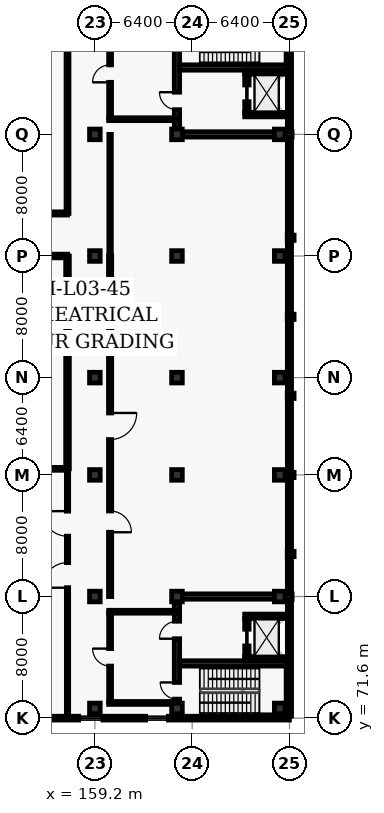
"""IFC4 building model, lengths in metres.
Left out: names, types, materials, properties, quantities, classifications, styles, units other than length and angle.
Written with IfcOpenShell. Run it as: python <this file> out.ifc"""

import sys

from ifc_helpers import new_model, si_unit, direction, frame, frame_2d, origin, origin_2d, place, context, subcontext, project, spatial, rectangle, extrude, element, fill, save


model = new_model("IFC4")
c1 = context("Model", 3, precision=1e-05, world=origin(), true_north=direction((0.0, 1.0)))
c2 = subcontext(c1, "Body", "Model", "MODEL_VIEW")
j1 = project(units=[si_unit("LENGTHUNIT", "METRE"), si_unit("PLANEANGLEUNIT", "RADIAN")], contexts=[c1])
p1 = place(None, origin())
s1 = spatial("IfcSite", under=j1, at=p1, CompositionType="ELEMENT")
p2 = place(p1, origin())
s2 = spatial("IfcBuilding", under=s1, at=p2, CompositionType="ELEMENT")
p3 = place(p2, frame((0.0, 0.0, 15.6)))
s3 = spatial("IfcBuildingStorey", under=s2, at=p3, CompositionType="ELEMENT", Elevation=15.6)
for number, where, z_axis, x_axis in (
    (1, (159.2, 72.24, 0.0), (0.0, 0.0, 1.0), (1.0, 0.0, 0.0)),
    (2, (159.2, 79.6, 0.0), (0.0, 0.0, 1.0), (1.0, 0.0, 0.0)),
    (3, (159.2, 87.6, 0.0), (0.0, 0.0, 1.0), (1.0, 0.0, 0.0)),
    (4, (159.2, 94.0, 0.0), (0.0, 0.0, 1.0), (1.0, 0.0, 0.0)),
    (5, (159.2, 102.0, 0.0), (0.0, 0.0, 1.0), (1.0, 0.0, 0.0)),
    (6, (159.2, 110.0, 0.0), (0.0, 0.0, 1.0), (1.0, 0.0, 0.0)),
    (7, (164.6, 72.24, 0.0), (0.0, 0.0, 1.0), (1.0, 0.0, 0.0)),
    (8, (164.6, 79.6, 0.0), (0.0, 0.0, 1.0), (1.0, 0.0, 0.0)),
    (9, (164.6, 87.6, 0.0), (0.0, 0.0, 1.0), (1.0, 0.0, 0.0)),
    (10, (164.6, 94.0, 0.0), (0.0, 0.0, 1.0), (1.0, 0.0, 0.0)),
    (11, (164.6, 102.0, 0.0), (0.0, 0.0, 1.0), (1.0, 0.0, 0.0)),
    (12, (164.6, 110.0, 0.0), (0.0, 0.0, 1.0), (1.0, 0.0, 0.0)),
    (13, (171.36, 72.24, 0.0), (0.0, 0.0, 1.0), (1.0, 0.0, 0.0)),
    (14, (171.36, 79.6, 0.0), (0.0, 0.0, 1.0), (1.0, 0.0, 0.0)),
    (15, (171.36, 87.6, 0.0), (0.0, 0.0, 1.0), (1.0, 0.0, 0.0)),
    (16, (171.36, 94.0, 0.0), (0.0, 0.0, 1.0), (1.0, 0.0, 0.0)),
    (17, (171.36, 102.0, 0.0), (0.0, 0.0, 1.0), (1.0, 0.0, 0.0)),
    (18, (171.36, 110.0, 0.0), (0.0, 0.0, 1.0), (1.0, 0.0, 0.0)),
):
    element("IfcColumn", number, at=place(p3, frame(where, z_axis=z_axis, x_axis=x_axis)), inside=s3, PredefinedType="COLUMN", context=c2, shape_type="SweptSolid", body=[
        extrude(rectangle(XDim=0.7, YDim=0.7, at=origin_2d()), origin(), (0.0, 0.0, 1.0), 4.8),
    ])
for number, where, z_axis, x_axis in (
    (19, (172.08, 82.4, 0.0), (0.0, 0.0, 1.0), (1.0, 0.0, 0.0)),
    (20, (172.08, 87.6, 0.0), (0.0, 0.0, 1.0), (1.0, 0.0, 0.0)),
    (21, (172.08, 92.8, 0.0), (0.0, 0.0, 1.0), (1.0, 0.0, 0.0)),
    (22, (172.08, 98.0, 0.0), (0.0, 0.0, 1.0), (1.0, 0.0, 0.0)),
    (23, (172.08, 103.2, 0.0), (0.0, 0.0, 1.0), (1.0, 0.0, 0.0)),
):
    element("IfcColumn", number, at=place(p3, frame(where, z_axis=z_axis, x_axis=x_axis)), inside=s3, PredefinedType="PILASTER", context=c2, shape_type="SweptSolid", body=[
        extrude(rectangle(XDim=0.35, YDim=0.45, at=origin_2d()), origin(), (0.0, 0.0, 1.0), 4.8),
    ])
p4 = place(p3, frame((172.0, 117.86, 0.0), z_axis=(0.0, 0.0, 1.0), x_axis=(0.0, -1.0, 0.0)))
e24 = element("IfcWall", 24, at=p4, inside=s3, PredefinedType="SOLIDWALL", context=c2, shape_type="SweptSolid", body=[
    extrude(rectangle(XDim=46.12, YDim=0.275, at=frame_2d((23.06, 0.0))), origin(), (0.0, 0.0, 1.0), 4.58),
])
p5 = place(p3, frame((172.0, 71.6, 0.0), z_axis=(0.0, 0.0, 1.0), x_axis=(-1.0, 0.0, 0.0)))
e25 = element("IfcWall", 25, at=p5, inside=s3, PredefinedType="SOLIDWALL", context=c2, shape_type="SweptSolid", body=[
    extrude(rectangle(XDim=32.4, YDim=0.25, at=frame_2d((16.2, 0.0))), origin(), (0.0, 0.0, 1.0), 4.58),
])
p6 = place(p5, frame((7.96, 0.0, 0.8)))
e26 = element("IfcOpeningElement", 26, at=p6, cuts=e25, PredefinedType="OPENING", context=c2, shape_type="SweptSolid", body=[
    extrude(rectangle(XDim=1.5, YDim=2.1, at=frame_2d((0.75, 1.05))), frame((0.0, 0.135, 0.0), z_axis=(0.0, -1.0, 0.0), x_axis=(1.0, 0.0, 0.0)), (0.0, 0.0, 1.0), 0.27),
])
p7 = place(p5, frame((12.27, 0.0, 0.8)))
e27 = element("IfcOpeningElement", 27, at=p7, cuts=e25, PredefinedType="OPENING", context=c2, shape_type="SweptSolid", body=[
    extrude(rectangle(XDim=1.6, YDim=2.1, at=frame_2d((0.8, 1.05))), frame((0.0, 0.135, 0.0), z_axis=(0.0, -1.0, 0.0), x_axis=(1.0, 0.0, 0.0)), (0.0, 0.0, 1.0), 0.27),
])
p8 = place(p5, frame((19.48, 0.0, 0.8)))
e28 = element("IfcOpeningElement", 28, at=p8, cuts=e25, PredefinedType="OPENING", context=c2, shape_type="SweptSolid", body=[
    extrude(rectangle(XDim=1.7, YDim=2.15, at=frame_2d((0.85, 1.075))), frame((0.0, 0.135, 0.0), z_axis=(0.0, -1.0, 0.0), x_axis=(1.0, 0.0, 0.0)), (0.0, 0.0, 1.0), 0.27),
])
p9 = place(p5, frame((25.24, 0.0, 0.8)))
e29 = element("IfcOpeningElement", 29, at=p9, cuts=e25, PredefinedType="OPENING", context=c2, shape_type="SweptSolid", body=[
    extrude(rectangle(XDim=1.8, YDim=2.15, at=frame_2d((0.9, 1.075))), frame((0.0, 0.135, 0.0), z_axis=(0.0, -1.0, 0.0), x_axis=(1.0, 0.0, 0.0)), (0.0, 0.0, 1.0), 0.27),
])
p10 = place(p3, frame((164.952, 79.6, 0.0), z_axis=(0.0, 0.0, 1.0), x_axis=(1.0, 0.0, 0.0)))
e30 = element("IfcWall", 30, at=p10, inside=s3, PredefinedType="SHEAR", context=c2, shape_type="SweptSolid", body=[
    extrude(rectangle(XDim=7.223, YDim=0.35, at=frame_2d((3.612, 0.0))), origin(), (0.0, 0.0, 1.0), 4.58),
])
p11 = place(p3, frame((164.6, 71.775, 0.0), z_axis=(0.0, 0.0, 1.0), x_axis=(0.0, 1.0, 0.0)))
e31 = element("IfcWall", 31, at=p11, inside=s3, PredefinedType="SHEAR", context=c2, shape_type="SweptSolid", body=[
    extrude(rectangle(XDim=7.473, YDim=0.35, at=frame_2d((3.737, 0.0))), origin(), (0.0, 0.0, 1.0), 4.58),
])
p12 = place(p11, frame((1.075, 0.0, 0.0)))
e32 = element("IfcOpeningElement", 32, at=p12, cuts=e31, PredefinedType="OPENING", context=c2, shape_type="SweptSolid", body=[
    extrude(rectangle(XDim=1.1, YDim=2.15, at=frame_2d((0.55, 1.075))), frame((0.0, 0.185, 0.0), z_axis=(0.0, -1.0, 0.0), x_axis=(1.0, 0.0, 0.0)), (0.0, 0.0, 1.0), 0.37),
])
p13 = place(p11, frame((5.05, 0.0, 0.0)))
e33 = element("IfcOpeningElement", 33, at=p13, cuts=e31, PredefinedType="OPENING", context=c2, shape_type="SweptSolid", body=[
    extrude(rectangle(XDim=1.15, YDim=2.2, at=frame_2d((0.575, 1.1))), frame((0.0, 0.185, 0.0), z_axis=(0.0, -1.0, 0.0), x_axis=(1.0, 0.0, 0.0)), (0.0, 0.0, 1.0), 0.37),
])
p14 = place(p3, frame((164.775, 75.2, 0.0), z_axis=(0.0, 0.0, 1.0), x_axis=(1.0, 0.0, 0.0)))
e34 = element("IfcWall", 34, at=p14, inside=s3, PredefinedType="SHEAR", context=c2, shape_type="SweptSolid", body=[
    extrude(rectangle(XDim=7.05, YDim=0.35, at=frame_2d((3.525, 0.0))), origin(), (0.0, 0.0, 1.0), 4.58),
])
for number, where, z_axis, x_axis in (
    (35, (169.055, 75.5, 0.0), (0.0, 0.0, 1.0), (1.0, 0.0, 0.0)),
    (36, (169.055, 78.3, 0.0), (0.0, 0.0, 1.0), (1.0, 0.0, 0.0)),
):
    element("IfcWall", number, at=place(p3, frame(where, z_axis=z_axis, x_axis=x_axis)), inside=s3, PredefinedType="SHEAR", context=c2, shape_type="SweptSolid", body=[
        extrude(rectangle(XDim=2.89, YDim=0.29, at=frame_2d((1.445, 0.0))), origin(), (0.0, 0.0, 1.0), 4.58),
    ])
p15 = place(p3, frame((169.2, 75.645, 0.0), z_axis=(0.0, 0.0, 1.0), x_axis=(0.0, 1.0, 0.0)))
e37 = element("IfcWall", 37, at=p15, inside=s3, PredefinedType="SHEAR", context=c2, shape_type="SweptSolid", body=[
    extrude(rectangle(XDim=2.51, YDim=0.29, at=frame_2d((1.255, 0.0))), origin(), (0.0, 0.0, 1.0), 4.58),
])
p16 = place(p15, frame((0.705, 0.0, 0.0)))
e38 = element("IfcOpeningElement", 38, at=p16, cuts=e37, PredefinedType="OPENING", context=c2, shape_type="SweptSolid", body=[
    extrude(rectangle(XDim=1.1, YDim=2.15, at=frame_2d((0.55, 1.075))), frame((0.0, 0.155, 0.0), z_axis=(0.0, -1.0, 0.0), x_axis=(1.0, 0.0, 0.0)), (0.0, 0.0, 1.0), 0.31),
])
p17 = place(p3, frame((160.105, 72.6, 0.0), z_axis=(0.0, 0.0, 1.0), x_axis=(1.0, 0.0, 0.0)))
e39 = element("IfcWall", 39, at=p17, inside=s3, PredefinedType="PARTITIONING", context=c2, shape_type="SweptSolid", body=[
    extrude(rectangle(XDim=4.143, YDim=0.19, at=frame_2d((2.072, 0.0))), origin(), (0.0, 0.0, 1.0), 3.93),
])
p18 = place(p3, frame((160.105, 78.6, 0.0), z_axis=(0.0, 0.0, 1.0), x_axis=(1.0, 0.0, 0.0)))
e40 = element("IfcWall", 40, at=p18, inside=s3, PredefinedType="PARTITIONING", context=c2, shape_type="SweptSolid", body=[
    extrude(rectangle(XDim=4.495, YDim=0.19, at=frame_2d((2.248, 0.0))), origin(), (0.0, 0.0, 1.0), 4.58),
])
p19 = place(p3, frame((160.2, 72.695, 0.0), z_axis=(0.0, 0.0, 1.0), x_axis=(0.0, 1.0, 0.0)))
e41 = element("IfcWall", 41, at=p19, inside=s3, PredefinedType="PARTITIONING", context=c2, shape_type="SweptSolid", body=[
    extrude(rectangle(XDim=5.81, YDim=0.19, at=frame_2d((2.905, 0.0))), origin(), (0.0, 0.0, 1.0), 4.58),
])
p20 = place(p19, frame((2.33, 0.0, 0.0)))
e42 = element("IfcOpeningElement", 42, at=p20, cuts=e41, PredefinedType="OPENING", context=c2, shape_type="SweptSolid", body=[
    extrude(rectangle(XDim=1.15, YDim=2.2, at=frame_2d((0.575, 1.1))), frame((0.0, 0.105, 0.0), z_axis=(0.0, -1.0, 0.0), x_axis=(1.0, 0.0, 0.0)), (0.0, 0.0, 1.0), 0.21),
])
p21 = place(p3, frame((164.952, 110.0, 0.0), z_axis=(0.0, 0.0, 1.0), x_axis=(1.0, 0.0, 0.0)))
e43 = element("IfcWall", 43, at=p21, inside=s3, PredefinedType="SHEAR", context=c2, shape_type="SweptSolid", body=[
    extrude(rectangle(XDim=7.223, YDim=0.35, at=frame_2d((3.612, 0.0))), origin(), (0.0, 0.0, 1.0), 4.58),
])
p22 = place(p3, frame((164.6, 110.352, 0.0), z_axis=(0.0, 0.0, 1.0), x_axis=(0.0, 1.0, 0.0)))
e44 = element("IfcWall", 44, at=p22, inside=s3, PredefinedType="SHEAR", context=c2, shape_type="SweptSolid", body=[
    extrude(rectangle(XDim=7.473, YDim=0.35, at=frame_2d((3.736, 0.0))), origin(), (0.0, 0.0, 1.0), 4.58),
])
p23 = place(p22, frame((5.298, 0.0, 0.0)))
e45 = element("IfcOpeningElement", 45, at=p23, cuts=e44, PredefinedType="OPENING", context=c2, shape_type="SweptSolid", body=[
    extrude(rectangle(XDim=1.1, YDim=2.15, at=frame_2d((0.55, 1.075))), frame((0.0, 0.185, 0.0), z_axis=(0.0, -1.0, 0.0), x_axis=(1.0, 0.0, 0.0)), (0.0, 0.0, 1.0), 0.37),
])
p24 = place(p22, frame((1.273, 0.0, 0.0)))
e46 = element("IfcOpeningElement", 46, at=p24, cuts=e44, PredefinedType="OPENING", context=c2, shape_type="SweptSolid", body=[
    extrude(rectangle(XDim=1.15, YDim=2.2, at=frame_2d((0.575, 1.1))), frame((0.0, 0.185, 0.0), z_axis=(0.0, -1.0, 0.0), x_axis=(1.0, 0.0, 0.0)), (0.0, 0.0, 1.0), 0.37),
])
p25 = place(p3, frame((164.775, 114.4, 0.0), z_axis=(0.0, 0.0, 1.0), x_axis=(1.0, 0.0, 0.0)))
e47 = element("IfcWall", 47, at=p25, inside=s3, PredefinedType="SHEAR", context=c2, shape_type="SweptSolid", body=[
    extrude(rectangle(XDim=7.05, YDim=0.35, at=frame_2d((3.525, 0.0))), origin(), (0.0, 0.0, 1.0), 4.58),
])
for number, where, z_axis, x_axis in (
    (48, (169.055, 111.3, 0.0), (0.0, 0.0, 1.0), (1.0, 0.0, 0.0)),
    (49, (169.055, 114.1, 0.0), (0.0, 0.0, 1.0), (1.0, 0.0, 0.0)),
):
    element("IfcWall", number, at=place(p3, frame(where, z_axis=z_axis, x_axis=x_axis)), inside=s3, PredefinedType="SHEAR", context=c2, shape_type="SweptSolid", body=[
        extrude(rectangle(XDim=2.89, YDim=0.29, at=frame_2d((1.445, 0.0))), origin(), (0.0, 0.0, 1.0), 4.58),
    ])
p26 = place(p3, frame((169.2, 111.445, 0.0), z_axis=(0.0, 0.0, 1.0), x_axis=(0.0, 1.0, 0.0)))
e50 = element("IfcWall", 50, at=p26, inside=s3, PredefinedType="SHEAR", context=c2, shape_type="SweptSolid", body=[
    extrude(rectangle(XDim=2.51, YDim=0.29, at=frame_2d((1.255, 0.0))), origin(), (0.0, 0.0, 1.0), 4.58),
])
p27 = place(p26, frame((0.705, 0.0, 0.0)))
e51 = element("IfcOpeningElement", 51, at=p27, cuts=e50, PredefinedType="OPENING", context=c2, shape_type="SweptSolid", body=[
    extrude(rectangle(XDim=1.1, YDim=2.15, at=frame_2d((0.55, 1.075))), frame((0.0, 0.155, 0.0), z_axis=(0.0, -1.0, 0.0), x_axis=(1.0, 0.0, 0.0)), (0.0, 0.0, 1.0), 0.31),
])
p28 = place(p3, frame((160.105, 111.0, 0.0), z_axis=(0.0, 0.0, 1.0), x_axis=(1.0, 0.0, 0.0)))
e52 = element("IfcWall", 52, at=p28, inside=s3, PredefinedType="PARTITIONING", context=c2, shape_type="SweptSolid", body=[
    extrude(rectangle(XDim=4.495, YDim=0.19, at=frame_2d((2.248, 0.0))), origin(), (0.0, 0.0, 1.0), 4.58),
])
p29 = place(p3, frame((160.2, 111.095, 0.0), z_axis=(0.0, 0.0, 1.0), x_axis=(0.0, 1.0, 0.0)))
e53 = element("IfcWall", 53, at=p29, inside=s3, PredefinedType="PARTITIONING", context=c2, shape_type="SweptSolid", body=[
    extrude(rectangle(XDim=5.81, YDim=0.19, at=frame_2d((2.905, 0.0))), origin(), (0.0, 0.0, 1.0), 4.58),
])
p30 = place(p29, frame((2.33, 0.0, 0.0)))
e54 = element("IfcOpeningElement", 54, at=p30, cuts=e53, PredefinedType="OPENING", context=c2, shape_type="SweptSolid", body=[
    extrude(rectangle(XDim=1.15, YDim=2.2, at=frame_2d((0.575, 1.1))), frame((0.0, 0.105, 0.0), z_axis=(0.0, -1.0, 0.0), x_axis=(1.0, 0.0, 0.0)), (0.0, 0.0, 1.0), 0.21),
])
p31 = place(p3, frame((157.4, 102.0, 0.0), z_axis=(0.0, 0.0, 1.0), x_axis=(-1.0, 0.0, 0.0)))
e55 = element("IfcWall", 55, at=p31, inside=s3, PredefinedType="PARTITIONING", context=c2, shape_type="SweptSolid", body=[
    extrude(rectangle(XDim=17.8, YDim=0.24, at=frame_2d((8.9, 0.0))), origin(), (0.0, 0.0, 1.0), 3.93),
])
p32 = place(p31, frame((8.05, 0.0, 0.0)))
e56 = element("IfcOpeningElement", 56, at=p32, cuts=e55, PredefinedType="OPENING", context=c2, shape_type="SweptSolid", body=[
    extrude(rectangle(XDim=1.7, YDim=2.3, at=frame_2d((0.85, 1.15))), frame((0.0, 0.13, 0.0), z_axis=(0.0, -1.0, 0.0), x_axis=(1.0, 0.0, 0.0)), (0.0, 0.0, 1.0), 0.26),
])
p33 = place(p31, frame((13.184, 0.0, 0.0)))
e57 = element("IfcOpeningElement", 57, at=p33, cuts=e55, PredefinedType="OPENING", context=c2, shape_type="SweptSolid", body=[
    extrude(rectangle(XDim=1.4, YDim=2.25, at=frame_2d((0.7, 1.125))), frame((0.0, 0.13, 0.0), z_axis=(0.0, -1.0, 0.0), x_axis=(1.0, 0.0, 0.0)), (0.0, 0.0, 1.0), 0.26),
])
p34 = place(p3, frame((139.6, 104.8, 0.0), z_axis=(0.0, 0.0, 1.0), x_axis=(1.0, 0.0, 0.0)))
e58 = element("IfcWall", 58, at=p34, inside=s3, PredefinedType="PARTITIONING", context=c2, shape_type="SweptSolid", body=[
    extrude(rectangle(XDim=17.8, YDim=0.21, at=frame_2d((8.9, 0.0))), origin(), (0.0, 0.0, 1.0), 4.58),
])
p35 = place(p34, frame((8.39, 0.0, 0.0)))
e59 = element("IfcOpeningElement", 59, at=p35, cuts=e58, PredefinedType="OPENING", context=c2, shape_type="SweptSolid", body=[
    extrude(rectangle(XDim=1.02, YDim=2.1, at=frame_2d((0.51, 1.05))), frame((0.0, 0.115, 0.0), z_axis=(0.0, -1.0, 0.0), x_axis=(1.0, 0.0, 0.0)), (0.0, 0.0, 1.0), 0.23),
])
p36 = place(p34, frame((13.184, 0.0, 0.0)))
e60 = element("IfcOpeningElement", 60, at=p36, cuts=e58, PredefinedType="OPENING", context=c2, shape_type="SweptSolid", body=[
    extrude(rectangle(XDim=1.4, YDim=2.25, at=frame_2d((0.7, 1.125))), frame((0.0, 0.115, 0.0), z_axis=(0.0, -1.0, 0.0), x_axis=(1.0, 0.0, 0.0)), (0.0, 0.0, 1.0), 0.23),
])
p37 = place(p3, frame((157.4, 104.8, 0.0), z_axis=(0.0, 0.0, 1.0), x_axis=(0.0, 1.0, 0.0)))
e61 = element("IfcWall", 61, at=p37, inside=s3, PredefinedType="PARTITIONING", context=c2, shape_type="SweptSolid", body=[
    extrude(rectangle(XDim=13.2, YDim=0.19, at=frame_2d((6.6, 0.0))), origin(), (0.0, 0.0, 1.0), 4.58),
])
p38 = place(p3, frame((160.2, 110.0, 0.0), z_axis=(0.0, 0.0, 1.0), x_axis=(0.0, -1.0, 0.0)))
e62 = element("IfcWall", 62, at=p38, inside=s3, PredefinedType="PARTITIONING", context=c2, shape_type="SweptSolid", body=[
    extrude(rectangle(XDim=8.0, YDim=0.165, at=frame_2d((4.0, 0.0))), origin(), (0.0, 0.0, 1.0), 4.58),
])
p39 = place(p3, frame((157.4, 71.6, 0.0), z_axis=(0.0, 0.0, 1.0), x_axis=(0.0, 1.0, 0.0)))
e63 = element("IfcWall", 63, at=p39, inside=s3, PredefinedType="PARTITIONING", context=c2, shape_type="SweptSolid", body=[
    extrude(rectangle(XDim=16.4, YDim=0.15, at=frame_2d((8.2, 0.0))), origin(), (0.0, 0.0, 1.0), 4.58),
])
p40 = place(p39, frame((8.58, 0.0, 0.0)))
e64 = element("IfcOpeningElement", 64, at=p40, cuts=e63, PredefinedType="OPENING", context=c2, shape_type="SweptSolid", body=[
    extrude(rectangle(XDim=1.65, YDim=2.3, at=frame_2d((0.825, 1.15))), frame((0.0, 0.085, 0.0), z_axis=(0.0, -1.0, 0.0), x_axis=(1.0, 0.0, 0.0)), (0.0, 0.0, 1.0), 0.17),
])
p41 = place(p39, frame((11.967, 0.0, 0.0)))
e65 = element("IfcOpeningElement", 65, at=p41, cuts=e63, PredefinedType="OPENING", context=c2, shape_type="SweptSolid", body=[
    extrude(rectangle(XDim=1.65, YDim=2.3, at=frame_2d((0.825, 1.15))), frame((0.0, 0.085, 0.0), z_axis=(0.0, -1.0, 0.0), x_axis=(1.0, 0.0, 0.0)), (0.0, 0.0, 1.0), 0.17),
])
p42 = place(p3, frame((157.4, 88.0, 0.0), z_axis=(0.0, 0.0, 1.0), x_axis=(0.0, 1.0, 0.0)))
e66 = element("IfcWall", 66, at=p42, inside=s3, PredefinedType="PARTITIONING", context=c2, shape_type="SweptSolid", body=[
    extrude(rectangle(XDim=14.0, YDim=0.24, at=frame_2d((7.0, 0.0))), origin(), (0.0, 0.0, 1.0), 4.58),
])
p43 = place(p3, frame((160.2, 102.0, 0.0), z_axis=(0.0, 0.0, 1.0), x_axis=(0.0, -1.0, 0.0)))
e67 = element("IfcWall", 67, at=p43, inside=s3, PredefinedType="PARTITIONING", context=c2, shape_type="SweptSolid", body=[
    extrude(rectangle(XDim=22.4, YDim=0.21, at=frame_2d((11.2, 0.0))), origin(), (0.0, 0.0, 1.0), 4.58),
])
p44 = place(p43, frame((10.325, 0.0, 0.0)))
e68 = element("IfcOpeningElement", 68, at=p44, cuts=e67, PredefinedType="OPENING", context=c2, shape_type="SweptSolid", body=[
    extrude(rectangle(XDim=1.75, YDim=2.35, at=frame_2d((0.875, 1.175))), frame((0.0, 0.115, 0.0), z_axis=(0.0, -1.0, 0.0), x_axis=(1.0, 0.0, 0.0)), (0.0, 0.0, 1.0), 0.23),
])
p45 = place(p43, frame((16.772, 0.0, 0.0)))
e69 = element("IfcOpeningElement", 69, at=p45, cuts=e67, PredefinedType="OPENING", context=c2, shape_type="SweptSolid", body=[
    extrude(rectangle(XDim=1.4, YDim=2.25, at=frame_2d((0.7, 1.125))), frame((0.0, 0.115, 0.0), z_axis=(0.0, -1.0, 0.0), x_axis=(1.0, 0.0, 0.0)), (0.0, 0.0, 1.0), 0.23),
])
p46 = place(p3, frame((139.6, 88.0, 0.0), z_axis=(0.0, 0.0, 1.0), x_axis=(1.0, 0.0, 0.0)))
e70 = element("IfcWall", 70, at=p46, inside=s3, PredefinedType="PARTITIONING", context=c2, shape_type="SweptSolid", body=[
    extrude(rectangle(XDim=17.8, YDim=0.19, at=frame_2d((8.9, 0.0))), origin(), (0.0, 0.0, 1.0), 3.93),
])
p47 = place(p6, origin())
e71 = element("IfcWindow", 71, at=p47, inside=s3, PartitioningType="SINGLE_PANEL", PredefinedType="WINDOW", context=c2, shape_type="SweptSolid", body=[
    extrude(rectangle(XDim=1.5, YDim=2.1, at=frame_2d((0.75, 1.05))), frame((0.0, 0.03, 0.0), z_axis=(0.0, -1.0, 0.0), x_axis=(1.0, 0.0, 0.0)), (0.0, 0.0, 1.0), 0.06),
])
fill(e26, e71)
p48 = place(p7, origin())
e72 = element("IfcWindow", 72, at=p48, inside=s3, PartitioningType="SINGLE_PANEL", PredefinedType="WINDOW", context=c2, shape_type="SweptSolid", body=[
    extrude(rectangle(XDim=1.6, YDim=2.1, at=frame_2d((0.8, 1.05))), frame((0.0, 0.03, 0.0), z_axis=(0.0, -1.0, 0.0), x_axis=(1.0, 0.0, 0.0)), (0.0, 0.0, 1.0), 0.06),
])
fill(e27, e72)
p49 = place(p12, origin())
e73 = element("IfcDoor", 73, at=p49, inside=s3, OperationType="SINGLE_SWING_RIGHT", PredefinedType="DOOR", context=c2, shape_type="SweptSolid", body=[
    extrude(rectangle(XDim=1.1, YDim=2.15, at=frame_2d((0.55, 1.075))), frame((0.0, 0.025, 0.0), z_axis=(0.0, -1.0, 0.0), x_axis=(1.0, 0.0, 0.0)), (0.0, 0.0, 1.0), 0.05),
])
fill(e32, e73)
p50 = place(p13, origin())
e74 = element("IfcDoor", 74, at=p50, inside=s3, OperationType="SINGLE_SWING_LEFT", PredefinedType="DOOR", context=c2, shape_type="SweptSolid", body=[
    extrude(rectangle(XDim=1.15, YDim=2.2, at=frame_2d((0.575, 1.1))), frame((0.0, 0.025, 0.0), z_axis=(0.0, -1.0, 0.0), x_axis=(1.0, 0.0, 0.0)), (0.0, 0.0, 1.0), 0.05),
])
fill(e33, e74)
p51 = place(p16, origin())
e75 = element("IfcDoor", 75, at=p51, inside=s3, OperationType="SLIDING_TO_LEFT", PredefinedType="DOOR", context=c2, shape_type="SweptSolid", body=[
    extrude(rectangle(XDim=1.1, YDim=2.15, at=frame_2d((0.55, 1.075))), frame((0.0, 0.025, 0.0), z_axis=(0.0, -1.0, 0.0), x_axis=(1.0, 0.0, 0.0)), (0.0, 0.0, 1.0), 0.05),
])
fill(e38, e75)
p52 = place(p20, origin())
e76 = element("IfcDoor", 76, at=p52, inside=s3, OperationType="SINGLE_SWING_RIGHT", PredefinedType="DOOR", context=c2, shape_type="SweptSolid", body=[
    extrude(rectangle(XDim=1.15, YDim=2.2, at=frame_2d((0.575, 1.1))), frame((0.0, 0.025, 0.0), z_axis=(0.0, -1.0, 0.0), x_axis=(1.0, 0.0, 0.0)), (0.0, 0.0, 1.0), 0.05),
])
fill(e42, e76)
p53 = place(p24, origin())
e77 = element("IfcDoor", 77, at=p53, inside=s3, OperationType="SINGLE_SWING_RIGHT", PredefinedType="DOOR", context=c2, shape_type="SweptSolid", body=[
    extrude(rectangle(XDim=1.15, YDim=2.2, at=frame_2d((0.575, 1.1))), frame((0.0, 0.025, 0.0), z_axis=(0.0, -1.0, 0.0), x_axis=(1.0, 0.0, 0.0)), (0.0, 0.0, 1.0), 0.05),
])
fill(e46, e77)
p54 = place(p27, origin())
e78 = element("IfcDoor", 78, at=p54, inside=s3, OperationType="SLIDING_TO_LEFT", PredefinedType="DOOR", context=c2, shape_type="SweptSolid", body=[
    extrude(rectangle(XDim=1.1, YDim=2.15, at=frame_2d((0.55, 1.075))), frame((0.0, 0.025, 0.0), z_axis=(0.0, -1.0, 0.0), x_axis=(1.0, 0.0, 0.0)), (0.0, 0.0, 1.0), 0.05),
])
fill(e51, e78)
p55 = place(p30, origin())
e79 = element("IfcDoor", 79, at=p55, inside=s3, OperationType="SINGLE_SWING_LEFT", PredefinedType="DOOR", context=c2, shape_type="SweptSolid", body=[
    extrude(rectangle(XDim=1.15, YDim=2.2, at=frame_2d((0.575, 1.1))), frame((0.0, 0.025, 0.0), z_axis=(0.0, -1.0, 0.0), x_axis=(1.0, 0.0, 0.0)), (0.0, 0.0, 1.0), 0.05),
])
fill(e54, e79)
p56 = place(p40, origin())
e80 = element("IfcDoor", 80, at=p56, inside=s3, OperationType="SINGLE_SWING_LEFT", PredefinedType="DOOR", context=c2, shape_type="SweptSolid", body=[
    extrude(rectangle(XDim=1.65, YDim=2.3, at=frame_2d((0.825, 1.15))), frame((0.0, 0.025, 0.0), z_axis=(0.0, -1.0, 0.0), x_axis=(1.0, 0.0, 0.0)), (0.0, 0.0, 1.0), 0.05),
])
fill(e64, e80)
p57 = place(p41, origin())
e81 = element("IfcDoor", 81, at=p57, inside=s3, OperationType="SINGLE_SWING_RIGHT", PredefinedType="DOOR", context=c2, shape_type="SweptSolid", body=[
    extrude(rectangle(XDim=1.65, YDim=2.3, at=frame_2d((0.825, 1.15))), frame((0.0, 0.025, 0.0), z_axis=(0.0, -1.0, 0.0), x_axis=(1.0, 0.0, 0.0)), (0.0, 0.0, 1.0), 0.05),
])
fill(e65, e81)
p58 = place(p44, origin())
e82 = element("IfcDoor", 82, at=p58, inside=s3, OperationType="SINGLE_SWING_LEFT", PredefinedType="DOOR", context=c2, shape_type="SweptSolid", body=[
    extrude(rectangle(XDim=1.75, YDim=2.35, at=frame_2d((0.875, 1.175))), frame((0.0, 0.025, 0.0), z_axis=(0.0, -1.0, 0.0), x_axis=(1.0, 0.0, 0.0)), (0.0, 0.0, 1.0), 0.05),
])
fill(e68, e82)
p59 = place(p45, origin())
e83 = element("IfcDoor", 83, at=p59, inside=s3, OperationType="SINGLE_SWING_RIGHT", PredefinedType="DOOR", context=c2, shape_type="SweptSolid", body=[
    extrude(rectangle(XDim=1.4, YDim=2.25, at=frame_2d((0.7, 1.125))), frame((0.0, 0.025, 0.0), z_axis=(0.0, -1.0, 0.0), x_axis=(1.0, 0.0, 0.0)), (0.0, 0.0, 1.0), 0.05),
])
fill(e69, e83)
save(model, sys.argv[1])
